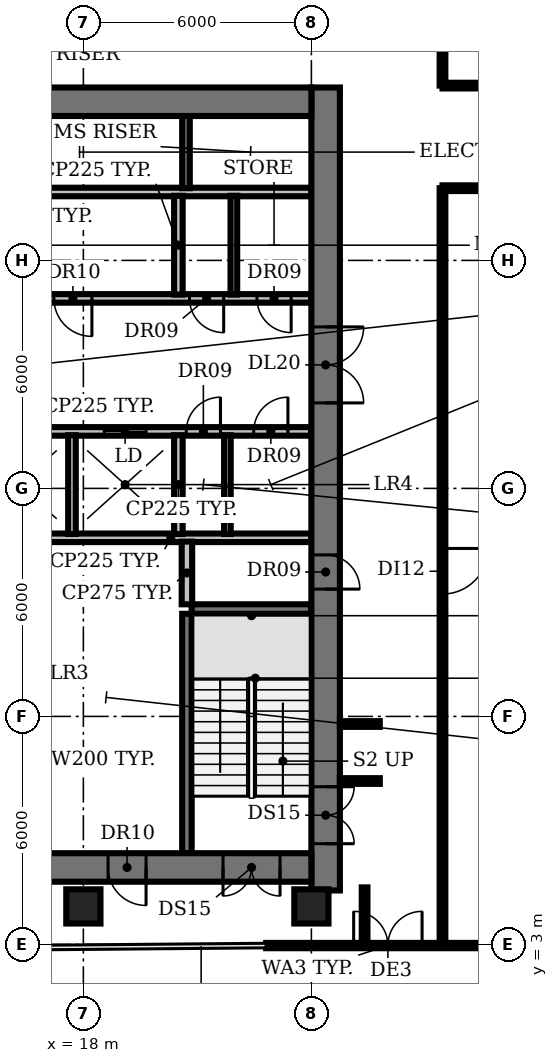
"""IFC4 building model, lengths in metres.
Left out: names, types, materials, properties, quantities, classifications, styles, units other than length and angle.
Written with IfcOpenShell. Run it as: python <this file> out.ifc"""

import sys

from ifc_helpers import new_model, si_unit, direction, frame, frame_2d, origin, origin_2d, place, context, subcontext, project, spatial, rectangle, extrude, element, fill, save


model = new_model("IFC4")
c1 = context("Model", 3, precision=1e-05, world=origin(), true_north=direction((0.0, 1.0)))
c2 = subcontext(c1, "Body", "Model", "MODEL_VIEW")
j1 = project(units=[si_unit("LENGTHUNIT", "METRE"), si_unit("PLANEANGLEUNIT", "RADIAN")], contexts=[c1])
p1 = place(None, origin())
s1 = spatial("IfcSite", under=j1, at=p1, CompositionType="ELEMENT")
p2 = place(p1, origin())
s2 = spatial("IfcBuilding", under=s1, at=p2, CompositionType="ELEMENT")
p3 = place(p2, frame((0.0, 0.0, 108.8)))
s3 = spatial("IfcBuildingStorey", under=s2, at=p3, CompositionType="ELEMENT", Elevation=108.8)
for number, where, z_axis, x_axis in (
    (1, (18.0, 4.0, 0.0), (0.0, 0.0, 1.0), (1.0, 0.0, 0.0)),
    (2, (24.0, 4.0, 0.0), (0.0, 0.0, 1.0), (1.0, 0.0, 0.0)),
):
    element("IfcColumn", number, at=place(p3, frame(where, z_axis=z_axis, x_axis=x_axis)), inside=s3, PredefinedType="COLUMN", context=c2, shape_type="SweptSolid", body=[
        extrude(rectangle(XDim=0.9, YDim=0.9, at=origin_2d()), origin(), (0.0, 0.0, 1.0), 3.85),
    ])
p4 = place(p3, frame((22.811, 2.97, 0.0), z_axis=(0.0, 0.0, 1.0), x_axis=(1.0, 0.0, 0.0)))
e3 = element("IfcWall", 3, at=p4, inside=s3, PredefinedType="SOLIDWALL", context=c2, shape_type="SweptSolid", body=[
    extrude(rectangle(XDim=6.404, YDim=0.14, at=frame_2d((3.202, 0.0))), origin(), (0.0, 0.0, 1.0), 3.85),
])
p5 = place(p4, frame((2.302, 0.0, 0.0)))
e4 = element("IfcOpeningElement", 4, at=p5, cuts=e3, PredefinedType="OPENING", context=c2, shape_type="SweptSolid", body=[
    extrude(rectangle(XDim=1.8, YDim=2.4, at=frame_2d((0.9, 1.2))), frame((0.0, 0.08, 0.0), z_axis=(0.0, -1.0, 0.0), x_axis=(1.0, 0.0, 0.0)), (0.0, 0.0, 1.0), 0.16),
])
p6 = place(p3, frame((20.85, 11.825, 0.0), z_axis=(0.0, 0.0, 1.0), x_axis=(1.0, 0.0, 0.0)))
e5 = element("IfcWall", 5, at=p6, inside=s3, PredefinedType="SHEAR", context=c2, shape_type="SweptSolid", body=[
    extrude(rectangle(XDim=3.15, YDim=0.25, at=frame_2d((1.575, 0.0))), origin(), (0.0, 0.0, 1.0), 3.85),
])
p7 = place(p3, frame((16.6, 13.7, 0.0), z_axis=(0.0, 0.0, 1.0), x_axis=(1.0, 0.0, 0.0)))
e6 = element("IfcWall", 6, at=p7, inside=s3, PredefinedType="PARTITIONING", context=c2, shape_type="SweptSolid", body=[
    extrude(rectangle(XDim=7.4, YDim=0.225, at=frame_2d((3.7, 0.0))), origin(), (0.0, 0.0, 1.0), 3.85),
])
p8 = place(p3, frame((9.4, 16.5, 0.0), z_axis=(0.0, 0.0, 1.0), x_axis=(1.0, 0.0, 0.0)))
e7 = element("IfcWall", 7, at=p8, inside=s3, PredefinedType="PARTITIONING", context=c2, shape_type="SweptSolid", body=[
    extrude(rectangle(XDim=14.6, YDim=0.225, at=frame_2d((7.3, 0.0))), origin(), (0.0, 0.0, 1.0), 3.85),
])
p9 = place(p8, frame((0.75, 0.0, 0.0)))
e8 = element("IfcOpeningElement", 8, at=p9, cuts=e7, PredefinedType="OPENING", context=c2, shape_type="SweptSolid", body=[
    extrude(rectangle(XDim=1.1, YDim=2.1, at=frame_2d((0.55, 1.05))), frame((0.0, 0.123, 0.0), z_axis=(0.0, -1.0, 0.0), x_axis=(1.0, 0.0, 0.0)), (0.0, 0.0, 1.0), 0.245),
])
p10 = place(p8, frame((3.55, 0.0, 0.0)))
e9 = element("IfcOpeningElement", 9, at=p10, cuts=e7, PredefinedType="OPENING", context=c2, shape_type="SweptSolid", body=[
    extrude(rectangle(XDim=1.1, YDim=2.1, at=frame_2d((0.55, 1.05))), frame((0.0, 0.123, 0.0), z_axis=(0.0, -1.0, 0.0), x_axis=(1.0, 0.0, 0.0)), (0.0, 0.0, 1.0), 0.245),
])
p11 = place(p8, frame((6.35, 0.0, 0.0)))
e10 = element("IfcOpeningElement", 10, at=p11, cuts=e7, PredefinedType="OPENING", context=c2, shape_type="SweptSolid", body=[
    extrude(rectangle(XDim=1.1, YDim=2.1, at=frame_2d((0.55, 1.05))), frame((0.0, 0.123, 0.0), z_axis=(0.0, -1.0, 0.0), x_axis=(1.0, 0.0, 0.0)), (0.0, 0.0, 1.0), 0.245),
])
p12 = place(p8, frame((9.15, 0.0, 0.0)))
e11 = element("IfcOpeningElement", 11, at=p12, cuts=e7, PredefinedType="OPENING", context=c2, shape_type="SweptSolid", body=[
    extrude(rectangle(XDim=1.1, YDim=2.1, at=frame_2d((0.55, 1.05))), frame((0.0, 0.123, 0.0), z_axis=(0.0, -1.0, 0.0), x_axis=(1.0, 0.0, 0.0)), (0.0, 0.0, 1.0), 0.245),
])
p13 = place(p8, frame((11.308, 0.0, 0.0)))
e12 = element("IfcOpeningElement", 12, at=p13, cuts=e7, PredefinedType="OPENING", context=c2, shape_type="SweptSolid", body=[
    extrude(rectangle(XDim=0.9, YDim=2.1, at=frame_2d((0.45, 1.05))), frame((0.0, 0.123, 0.0), z_axis=(0.0, -1.0, 0.0), x_axis=(1.0, 0.0, 0.0)), (0.0, 0.0, 1.0), 0.245),
])
p14 = place(p8, frame((13.083, 0.0, 0.0)))
e13 = element("IfcOpeningElement", 13, at=p14, cuts=e7, PredefinedType="OPENING", context=c2, shape_type="SweptSolid", body=[
    extrude(rectangle(XDim=0.9, YDim=2.1, at=frame_2d((0.45, 1.05))), frame((0.0, 0.123, 0.0), z_axis=(0.0, -1.0, 0.0), x_axis=(1.0, 0.0, 0.0)), (0.0, 0.0, 1.0), 0.245),
])
p15 = place(p3, frame((24.0, 20.0, 0.0), z_axis=(0.0, 0.0, 1.0), x_axis=(-1.0, 0.0, 0.0)))
e14 = element("IfcWall", 14, at=p15, inside=s3, PredefinedType="PARTITIONING", context=c2, shape_type="SweptSolid", body=[
    extrude(rectangle(XDim=14.6, YDim=0.225, at=frame_2d((7.3, 0.0))), origin(), (0.0, 0.0, 1.0), 3.85),
])
p16 = place(p15, frame((11.35, 0.0, 0.0)))
e15 = element("IfcOpeningElement", 15, at=p16, cuts=e14, PredefinedType="OPENING", context=c2, shape_type="SweptSolid", body=[
    extrude(rectangle(XDim=1.0, YDim=2.1, at=frame_2d((0.5, 1.05))), frame((0.0, 0.123, 0.0), z_axis=(0.0, -1.0, 0.0), x_axis=(1.0, 0.0, 0.0)), (0.0, 0.0, 1.0), 0.245),
])
p17 = place(p15, frame((5.775, 0.0, 0.0)))
e16 = element("IfcOpeningElement", 16, at=p17, cuts=e14, PredefinedType="OPENING", context=c2, shape_type="SweptSolid", body=[
    extrude(rectangle(XDim=1.0, YDim=2.1, at=frame_2d((0.5, 1.05))), frame((0.0, 0.123, 0.0), z_axis=(0.0, -1.0, 0.0), x_axis=(1.0, 0.0, 0.0)), (0.0, 0.0, 1.0), 0.245),
])
p18 = place(p15, frame((2.308, 0.0, 0.0)))
e17 = element("IfcOpeningElement", 17, at=p18, cuts=e14, PredefinedType="OPENING", context=c2, shape_type="SweptSolid", body=[
    extrude(rectangle(XDim=0.9, YDim=2.1, at=frame_2d((0.45, 1.05))), frame((0.0, 0.123, 0.0), z_axis=(0.0, -1.0, 0.0), x_axis=(1.0, 0.0, 0.0)), (0.0, 0.0, 1.0), 0.245),
])
p19 = place(p15, frame((0.532, 0.0, 0.0)))
e18 = element("IfcOpeningElement", 18, at=p19, cuts=e14, PredefinedType="OPENING", context=c2, shape_type="SweptSolid", body=[
    extrude(rectangle(XDim=0.9, YDim=2.1, at=frame_2d((0.45, 1.05))), frame((0.0, 0.123, 0.0), z_axis=(0.0, -1.0, 0.0), x_axis=(1.0, 0.0, 0.0)), (0.0, 0.0, 1.0), 0.245),
])
p20 = place(p3, frame((9.4, 22.8, 0.0), z_axis=(0.0, 0.0, 1.0), x_axis=(1.0, 0.0, 0.0)))
e19 = element("IfcWall", 19, at=p20, inside=s3, PredefinedType="PARTITIONING", context=c2, shape_type="SweptSolid", body=[
    extrude(rectangle(XDim=14.6, YDim=0.225, at=frame_2d((7.3, 0.0))), origin(), (0.0, 0.0, 1.0), 3.85),
])
p21 = place(p3, frame((17.7, 13.8, 0.0), z_axis=(0.0, 0.0, 1.0), x_axis=(0.0, 1.0, 0.0)))
e20 = element("IfcWall", 20, at=p21, inside=s3, PredefinedType="SOLIDWALL", context=c2, shape_type="SweptSolid", body=[
    extrude(rectangle(XDim=2.6, YDim=0.2, at=frame_2d((1.3, 0.0))), origin(), (0.0, 0.0, 1.0), 3.85),
])
for number, where, z_axis, x_axis in (
    (21, (20.5, 13.8, 0.0), (0.0, 0.0, 1.0), (0.0, 1.0, 0.0)),
    (22, (20.5, 20.1, 0.0), (0.0, 0.0, 1.0), (0.0, 1.0, 0.0)),
):
    element("IfcWall", number, at=place(p3, frame(where, z_axis=z_axis, x_axis=x_axis)), inside=s3, PredefinedType="PARTITIONING", context=c2, shape_type="SweptSolid", body=[
        extrude(rectangle(XDim=2.6, YDim=0.225, at=frame_2d((1.3, 0.0))), origin(), (0.0, 0.0, 1.0), 3.85),
    ])
p22 = place(p3, frame((20.7, 22.9, 0.0), z_axis=(0.0, 0.0, 1.0), x_axis=(0.0, 1.0, 0.0)))
e23 = element("IfcWall", 23, at=p22, inside=s3, PredefinedType="SHEAR", context=c2, shape_type="SweptSolid", body=[
    extrude(rectangle(XDim=1.9, YDim=0.2, at=frame_2d((0.95, 0.0))), origin(), (0.0, 0.0, 1.0), 3.85),
])
p23 = place(p3, frame((20.725, 5.4, 0.0), z_axis=(0.0, 0.0, 1.0), x_axis=(0.0, 1.0, 0.0)))
e24 = element("IfcWall", 24, at=p23, inside=s3, PredefinedType="SHEAR", context=c2, shape_type="SweptSolid", body=[
    extrude(rectangle(XDim=6.3, YDim=0.25, at=frame_2d((3.15, 0.0))), origin(), (0.0, 0.0, 1.0), 3.85),
])
p24 = place(p3, frame((20.725, 11.95, 0.0), z_axis=(0.0, 0.0, 1.0), x_axis=(0.0, 1.0, 0.0)))
e25 = element("IfcWall", 25, at=p24, inside=s3, PredefinedType="PARTITIONING", context=c2, shape_type="SweptSolid", body=[
    extrude(rectangle(XDim=1.65, YDim=0.275, at=frame_2d((0.825, 0.0))), origin(), (0.0, 0.0, 1.0), 3.85),
])
for number, where, z_axis, x_axis in (
    (26, (21.79, 13.8, 0.0), (0.0, 0.0, 1.0), (0.0, 1.0, 0.0)),
    (27, (21.96, 20.1, 0.0), (0.0, 0.0, 1.0), (0.0, 1.0, 0.0)),
):
    element("IfcWall", number, at=place(p3, frame(where, z_axis=z_axis, x_axis=x_axis)), inside=s3, PredefinedType="PARTITIONING", context=c2, shape_type="SweptSolid", body=[
        extrude(rectangle(XDim=2.6, YDim=0.175, at=frame_2d((1.3, 0.0))), origin(), (0.0, 0.0, 1.0), 3.85),
    ])
p25 = place(p3, frame((24.375, 25.55, 0.0), z_axis=(0.0, 0.0, 1.0), x_axis=(0.0, -1.0, 0.0)))
e28 = element("IfcWall", 28, at=p25, inside=s3, PredefinedType="SHEAR", context=c2, shape_type="SweptSolid", body=[
    extrude(rectangle(XDim=21.13, YDim=0.75, at=frame_2d((10.565, 0.0))), origin(), (0.0, 0.0, 1.0), 3.85),
])
p26 = place(p25, frame((18.4, 0.0, 0.0)))
e29 = element("IfcOpeningElement", 29, at=p26, cuts=e28, PredefinedType="OPENING", context=c2, shape_type="SweptSolid", body=[
    extrude(rectangle(XDim=1.5, YDim=2.1, at=frame_2d((0.75, 1.05))), frame((0.0, 0.385, 0.0), z_axis=(0.0, -1.0, 0.0), x_axis=(1.0, 0.0, 0.0)), (0.0, 0.0, 1.0), 0.77),
])
p27 = place(p25, frame((12.3, 0.0, 0.0)))
e30 = element("IfcOpeningElement", 30, at=p27, cuts=e28, PredefinedType="OPENING", context=c2, shape_type="SweptSolid", body=[
    extrude(rectangle(XDim=0.9, YDim=2.1, at=frame_2d((0.45, 1.05))), frame((0.0, 0.385, 0.0), z_axis=(0.0, -1.0, 0.0), x_axis=(1.0, 0.0, 0.0)), (0.0, 0.0, 1.0), 0.77),
])
p28 = place(p25, frame((6.3, 0.0, 0.0)))
e31 = element("IfcOpeningElement", 31, at=p28, cuts=e28, PredefinedType="OPENING", context=c2, shape_type="SweptSolid", body=[
    extrude(rectangle(XDim=2.0, YDim=2.1, at=frame_2d((1.0, 1.05))), frame((0.0, 0.385, 0.0), z_axis=(0.0, -1.0, 0.0), x_axis=(1.0, 0.0, 0.0)), (0.0, 0.0, 1.0), 0.77),
])
p29 = place(p3, frame((24.0, 5.025, 0.0), z_axis=(0.0, 0.0, 1.0), x_axis=(-1.0, 0.0, 0.0)))
e32 = element("IfcWall", 32, at=p29, inside=s3, PredefinedType="SHEAR", context=c2, shape_type="SweptSolid", body=[
    extrude(rectangle(XDim=18.0, YDim=0.75, at=frame_2d((9.0, 0.0))), origin(), (0.0, 0.0, 1.0), 3.85),
])
p30 = place(p29, frame((0.825, 0.0, 0.0)))
e33 = element("IfcOpeningElement", 33, at=p30, cuts=e32, PredefinedType="OPENING", context=c2, shape_type="SweptSolid", body=[
    extrude(rectangle(XDim=1.5, YDim=2.1, at=frame_2d((0.75, 1.05))), frame((0.0, 0.385, 0.0), z_axis=(0.0, -1.0, 0.0), x_axis=(1.0, 0.0, 0.0)), (0.0, 0.0, 1.0), 0.77),
])
p31 = place(p29, frame((15.675, 0.0, 0.0)))
e34 = element("IfcOpeningElement", 34, at=p31, cuts=e32, PredefinedType="OPENING", context=c2, shape_type="SweptSolid", body=[
    extrude(rectangle(XDim=1.5, YDim=2.1, at=frame_2d((0.75, 1.05))), frame((0.0, 0.385, 0.0), z_axis=(0.0, -1.0, 0.0), x_axis=(1.0, 0.0, 0.0)), (0.0, 0.0, 1.0), 0.77),
])
p32 = place(p29, frame((13.0, 0.0, 0.0)))
e35 = element("IfcOpeningElement", 35, at=p32, cuts=e32, PredefinedType="OPENING", context=c2, shape_type="SweptSolid", body=[
    extrude(rectangle(XDim=1.2, YDim=2.1, at=frame_2d((0.6, 1.05))), frame((0.0, 0.385, 0.0), z_axis=(0.0, -1.0, 0.0), x_axis=(1.0, 0.0, 0.0)), (0.0, 0.0, 1.0), 0.77),
])
p33 = place(p29, frame((4.35, 0.0, 0.0)))
e36 = element("IfcOpeningElement", 36, at=p33, cuts=e32, PredefinedType="OPENING", context=c2, shape_type="SweptSolid", body=[
    extrude(rectangle(XDim=1.0, YDim=2.1, at=frame_2d((0.5, 1.05))), frame((0.0, 0.385, 0.0), z_axis=(0.0, -1.0, 0.0), x_axis=(1.0, 0.0, 0.0)), (0.0, 0.0, 1.0), 0.77),
])
p34 = place(p3, frame((6.0, 25.175, 0.0), z_axis=(0.0, 0.0, 1.0), x_axis=(1.0, 0.0, 0.0)))
e37 = element("IfcWall", 37, at=p34, inside=s3, PredefinedType="SHEAR", context=c2, shape_type="SweptSolid", body=[
    extrude(rectangle(XDim=18.0, YDim=0.75, at=frame_2d((9.0, 0.0))), origin(), (0.0, 0.0, 1.0), 3.85),
])
for number, where, z_axis, x_axis in (
    (38, (24.75, 7.3, 0.0), (0.0, 0.0, 1.0), (1.0, 0.0, 0.0)),
    (39, (24.75, 8.8, 0.0), (0.0, 0.0, 1.0), (1.0, 0.0, 0.0)),
):
    element("IfcWall", number, at=place(p3, frame(where, z_axis=z_axis, x_axis=x_axis)), inside=s3, PredefinedType="PARTITIONING", context=c2, shape_type="SweptSolid", body=[
        extrude(rectangle(XDim=1.05, YDim=0.15, at=frame_2d((0.525, 0.0))), origin(), (0.0, 0.0, 1.0), 2.83),
    ])
p35 = place(p3, frame((25.4, 3.02, 0.0), z_axis=(0.0, 0.0, 1.0), x_axis=(0.0, 1.0, 0.0)))
e40 = element("IfcWall", 40, at=p35, inside=s3, PredefinedType="PARTITIONING", context=c2, shape_type="SweptSolid", body=[
    extrude(rectangle(XDim=1.48, YDim=0.15, at=frame_2d((0.74, 0.0))), origin(), (0.0, 0.0, 1.0), 2.83),
])
p36 = place(p3, frame((27.45, 22.9, 0.0), z_axis=(0.0, 0.0, 1.0), x_axis=(0.0, -1.0, 0.0)))
e41 = element("IfcWall", 41, at=p36, inside=s3, PredefinedType="PARTITIONING", context=c2, shape_type="SweptSolid", body=[
    extrude(rectangle(XDim=19.88, YDim=0.15, at=frame_2d((9.94, 0.0))), origin(), (0.0, 0.0, 1.0), 2.83),
])
p37 = place(p36, frame((9.48, 0.0, 0.0)))
e42 = element("IfcOpeningElement", 42, at=p37, cuts=e41, PredefinedType="OPENING", context=c2, shape_type="SweptSolid", body=[
    extrude(rectangle(XDim=1.2, YDim=2.1, at=frame_2d((0.6, 1.05))), frame((0.0, 0.085, 0.0), z_axis=(0.0, -1.0, 0.0), x_axis=(1.0, 0.0, 0.0)), (0.0, 0.0, 1.0), 0.17),
])
p38 = place(p3, frame((27.45, 22.9, 0.0), z_axis=(0.0, 0.0, 1.0), x_axis=(1.0, 0.0, 0.0)))
e43 = element("IfcWall", 43, at=p38, inside=s3, PredefinedType="PARTITIONING", context=c2, shape_type="SweptSolid", body=[
    extrude(rectangle(XDim=14.55, YDim=0.15, at=frame_2d((7.275, 0.0))), origin(), (0.0, 0.0, 1.0), 2.83),
])
p39 = place(p3, frame((27.45, 25.6, 0.0), z_axis=(0.0, 0.0, 1.0), x_axis=(0.0, 1.0, 0.0)))
e44 = element("IfcWall", 44, at=p39, inside=s3, PredefinedType="PARTITIONING", context=c2, shape_type="SweptSolid", body=[
    extrude(rectangle(XDim=3.85, YDim=0.15, at=frame_2d((1.925, 0.0))), origin(), (0.0, 0.0, 1.0), 2.83),
])
p40 = place(p3, frame((27.45, 25.6, 0.0), z_axis=(0.0, 0.0, 1.0), x_axis=(1.0, 0.0, 0.0)))
e45 = element("IfcWall", 45, at=p40, inside=s3, PredefinedType="PARTITIONING", context=c2, shape_type="SweptSolid", body=[
    extrude(rectangle(XDim=8.55, YDim=0.15, at=frame_2d((4.275, 0.0))), origin(), (0.0, 0.0, 1.0), 2.83),
])
p41 = place(p40, frame((4.15, 0.0, 0.0)))
e46 = element("IfcOpeningElement", 46, at=p41, cuts=e45, PredefinedType="OPENING", context=c2, shape_type="SweptSolid", body=[
    extrude(rectangle(XDim=0.9, YDim=2.1, at=frame_2d((0.45, 1.05))), frame((0.0, 0.085, 0.0), z_axis=(0.0, -1.0, 0.0), x_axis=(1.0, 0.0, 0.0)), (0.0, 0.0, 1.0), 0.17),
])
p42 = place(p5, origin())
e47 = element("IfcDoor", 47, at=p42, inside=s3, OperationType="DOUBLE_DOOR_DOUBLE_SWING", PredefinedType="DOOR", context=c2, shape_type="SweptSolid", body=[
    extrude(rectangle(XDim=1.8, YDim=2.4, at=frame_2d((0.9, 1.2))), frame((0.0, 0.025, 0.0), z_axis=(0.0, -1.0, 0.0), x_axis=(1.0, 0.0, 0.0)), (0.0, 0.0, 1.0), 0.05),
])
fill(e4, e47)
p43 = place(p12, origin())
e48 = element("IfcDoor", 48, at=p43, inside=s3, OperationType="DOUBLE_DOOR_SLIDING", PredefinedType="DOOR", context=c2, shape_type="SweptSolid", body=[
    extrude(rectangle(XDim=1.1, YDim=2.1, at=frame_2d((0.55, 1.05))), frame((0.0, 0.025, 0.0), z_axis=(0.0, -1.0, 0.0), x_axis=(1.0, 0.0, 0.0)), (0.0, 0.0, 1.0), 0.05),
])
fill(e11, e48)
p44 = place(p13, origin())
e49 = element("IfcDoor", 49, at=p44, inside=s3, OperationType="SINGLE_SWING_RIGHT", PredefinedType="DOOR", context=c2, shape_type="SweptSolid", body=[
    extrude(rectangle(XDim=0.9, YDim=2.1, at=frame_2d((0.45, 1.05))), frame((0.0, 0.025, 0.0), z_axis=(0.0, -1.0, 0.0), x_axis=(1.0, 0.0, 0.0)), (0.0, 0.0, 1.0), 0.05),
])
fill(e12, e49)
p45 = place(p14, origin())
e50 = element("IfcDoor", 50, at=p45, inside=s3, OperationType="SINGLE_SWING_RIGHT", PredefinedType="DOOR", context=c2, shape_type="SweptSolid", body=[
    extrude(rectangle(XDim=0.9, YDim=2.1, at=frame_2d((0.45, 1.05))), frame((0.0, 0.025, 0.0), z_axis=(0.0, -1.0, 0.0), x_axis=(1.0, 0.0, 0.0)), (0.0, 0.0, 1.0), 0.05),
])
fill(e13, e50)
p46 = place(p17, origin())
e51 = element("IfcDoor", 51, at=p46, inside=s3, OperationType="SINGLE_SWING_LEFT", PredefinedType="DOOR", context=c2, shape_type="SweptSolid", body=[
    extrude(rectangle(XDim=1.0, YDim=2.1, at=frame_2d((0.5, 1.05))), frame((0.0, 0.025, 0.0), z_axis=(0.0, -1.0, 0.0), x_axis=(1.0, 0.0, 0.0)), (0.0, 0.0, 1.0), 0.05),
])
fill(e16, e51)
p47 = place(p18, origin())
e52 = element("IfcDoor", 52, at=p47, inside=s3, OperationType="SINGLE_SWING_LEFT", PredefinedType="DOOR", context=c2, shape_type="SweptSolid", body=[
    extrude(rectangle(XDim=0.9, YDim=2.1, at=frame_2d((0.45, 1.05))), frame((0.0, 0.025, 0.0), z_axis=(0.0, -1.0, 0.0), x_axis=(1.0, 0.0, 0.0)), (0.0, 0.0, 1.0), 0.05),
])
fill(e17, e52)
p48 = place(p19, origin())
e53 = element("IfcDoor", 53, at=p48, inside=s3, OperationType="SINGLE_SWING_LEFT", PredefinedType="DOOR", context=c2, shape_type="SweptSolid", body=[
    extrude(rectangle(XDim=0.9, YDim=2.1, at=frame_2d((0.45, 1.05))), frame((0.0, 0.025, 0.0), z_axis=(0.0, -1.0, 0.0), x_axis=(1.0, 0.0, 0.0)), (0.0, 0.0, 1.0), 0.05),
])
fill(e18, e53)
p49 = place(p26, origin())
e54 = element("IfcDoor", 54, at=p49, inside=s3, OperationType="DOUBLE_DOOR_SINGLE_SWING", PredefinedType="DOOR", context=c2, shape_type="SweptSolid", body=[
    extrude(rectangle(XDim=1.5, YDim=2.1, at=frame_2d((0.75, 1.05))), frame((0.0, 0.025, 0.0), z_axis=(0.0, -1.0, 0.0), x_axis=(1.0, 0.0, 0.0)), (0.0, 0.0, 1.0), 0.05),
])
fill(e29, e54)
p50 = place(p27, origin())
e55 = element("IfcDoor", 55, at=p50, inside=s3, OperationType="SINGLE_SWING_RIGHT", PredefinedType="DOOR", context=c2, shape_type="SweptSolid", body=[
    extrude(rectangle(XDim=0.9, YDim=2.1, at=frame_2d((0.45, 1.05))), frame((0.0, -0.315, 0.0), z_axis=(0.0, -1.0, 0.0), x_axis=(1.0, 0.0, 0.0)), (0.0, 0.0, 1.0), 0.05),
])
fill(e30, e55)
p51 = place(p28, origin())
e56 = element("IfcDoor", 56, at=p51, inside=s3, OperationType="DOUBLE_DOOR_SINGLE_SWING", PredefinedType="DOOR", context=c2, shape_type="SweptSolid", body=[
    extrude(rectangle(XDim=2.0, YDim=2.1, at=frame_2d((1.0, 1.05))), frame((0.0, 0.025, 0.0), z_axis=(0.0, -1.0, 0.0), x_axis=(1.0, 0.0, 0.0)), (0.0, 0.0, 1.0), 0.05),
])
fill(e31, e56)
p52 = place(p30, origin())
e57 = element("IfcDoor", 57, at=p52, inside=s3, OperationType="DOUBLE_DOOR_SINGLE_SWING", PredefinedType="DOOR", context=c2, shape_type="SweptSolid", body=[
    extrude(rectangle(XDim=1.5, YDim=2.1, at=frame_2d((0.75, 1.05))), frame((0.0, 0.025, 0.0), z_axis=(0.0, -1.0, 0.0), x_axis=(1.0, 0.0, 0.0)), (0.0, 0.0, 1.0), 0.05),
])
fill(e33, e57)
p53 = place(p33, origin())
e58 = element("IfcDoor", 58, at=p53, inside=s3, OperationType="SINGLE_SWING_LEFT", PredefinedType="DOOR", context=c2, shape_type="SweptSolid", body=[
    extrude(rectangle(XDim=1.0, YDim=2.1, at=frame_2d((0.5, 1.05))), frame((0.0, -0.315, 0.0), z_axis=(0.0, -1.0, 0.0), x_axis=(1.0, 0.0, 0.0)), (0.0, 0.0, 1.0), 0.05),
])
fill(e36, e58)
p54 = place(p37, origin())
e59 = element("IfcDoor", 59, at=p54, inside=s3, OperationType="SINGLE_SWING_LEFT", PredefinedType="DOOR", context=c2, shape_type="SweptSolid", body=[
    extrude(rectangle(XDim=1.2, YDim=2.1, at=frame_2d((0.6, 1.05))), frame((0.0, 0.025, 0.0), z_axis=(0.0, -1.0, 0.0), x_axis=(1.0, 0.0, 0.0)), (0.0, 0.0, 1.0), 0.05),
])
fill(e42, e59)
save(model, sys.argv[1])
